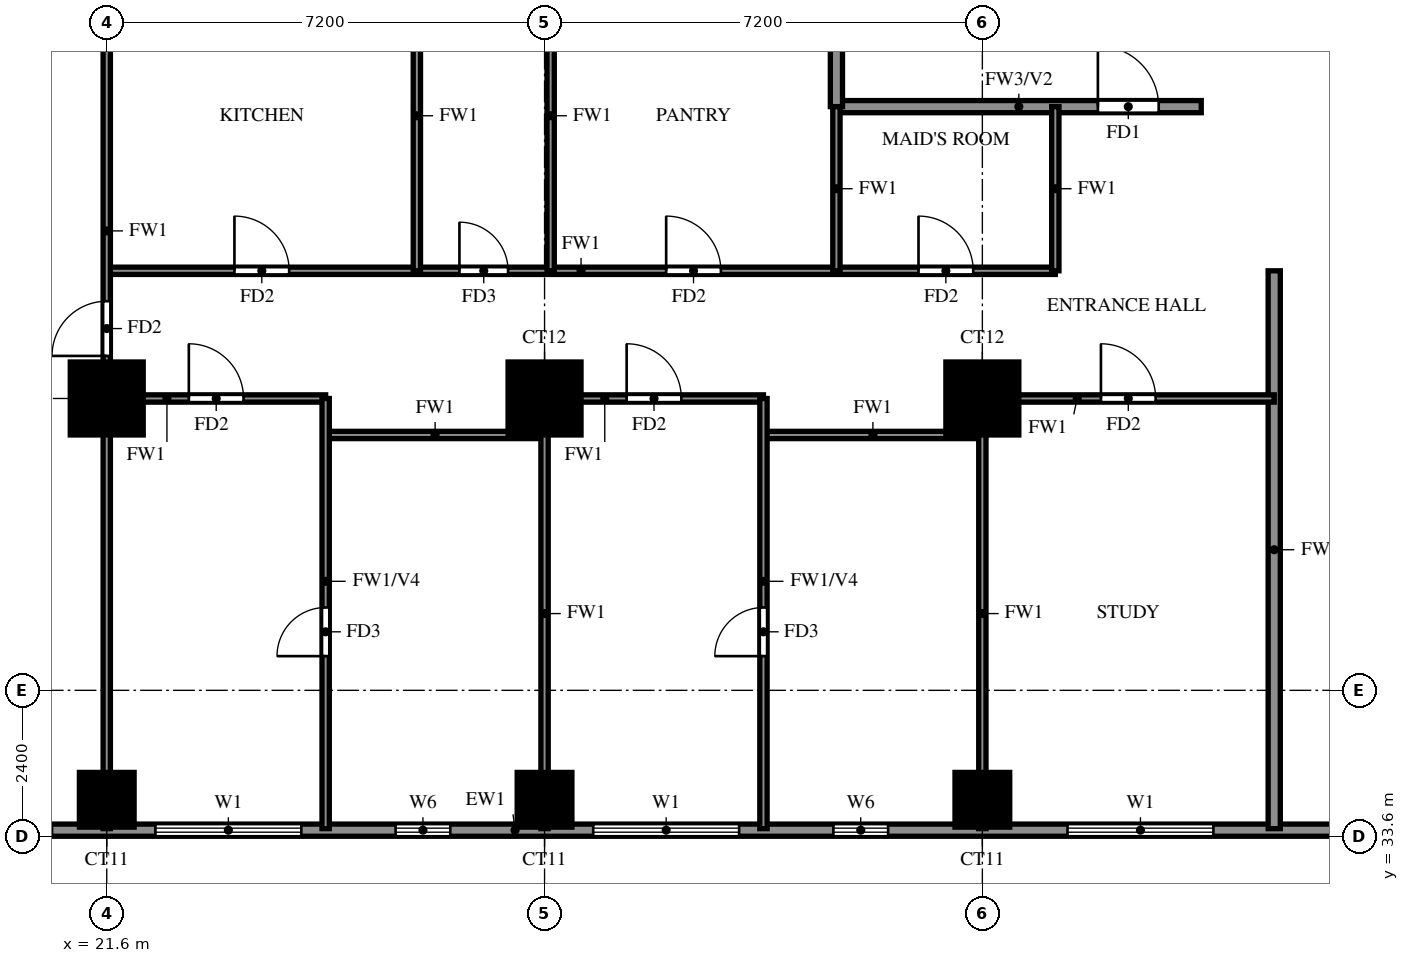
"""IFC4 building model, lengths in metres.
Left out: names, types, materials, properties, quantities, classifications, styles, units other than length and angle.
Written with IfcOpenShell. Run it as: python <this file> out.ifc"""

import sys

from ifc_helpers import new_model, si_unit, direction, frame, frame_2d, origin, origin_2d, place, context, subcontext, project, spatial, rectangle, extrude, source, transform, mapped, element, fill, save


model = new_model("IFC4")
c1 = context("Model", 3, precision=1e-05, world=origin(), true_north=direction((0.0, 1.0)))
c2 = subcontext(c1, "Body", "Model", "MODEL_VIEW")
j1 = project(units=[si_unit("LENGTHUNIT", "METRE"), si_unit("PLANEANGLEUNIT", "RADIAN")], contexts=[c1])
p1 = place(None, origin())
s1 = spatial("IfcSite", under=j1, at=p1, CompositionType="ELEMENT")
p2 = place(p1, origin())
s2 = spatial("IfcBuilding", under=s1, at=p2, CompositionType="ELEMENT")
p3 = place(p2, frame((0.0, 0.0, 100.5)))
s3 = spatial("IfcBuildingStorey", under=s2, at=p3, CompositionType="ELEMENT", Elevation=100.5)
m1 = source(origin(), c2, "Body", "SweptSolid", [
    extrude(rectangle(XDim=0.9, YDim=0.9, at=origin_2d()), origin(), (0.0, 0.0, 1.0), 3.18),
])
for number, where, z_axis, x_axis in (
    (1, (21.6, 34.2, 0.0), (0.0, 0.0, 1.0), (1.0, 0.0, 0.0)),
    (2, (28.8, 34.2, 0.0), (0.0, 0.0, 1.0), (1.0, 0.0, 0.0)),
    (3, (36.0, 34.2, 0.0), (0.0, 0.0, 1.0), (1.0, 0.0, 0.0)),
):
    element("IfcColumn", number, at=place(p3, frame(where, z_axis=z_axis, x_axis=x_axis)), inside=s3, PredefinedType="COLUMN", context=c2, shape_type="MappedRepresentation", body=[
        mapped(m1, transform((0.0, 0.0, 0.0))),
    ])
m2 = source(origin(), c2, "Body", "SweptSolid", [
    extrude(rectangle(XDim=1.2, YDim=1.2, at=origin_2d()), origin(), (0.0, 0.0, 1.0), 3.18),
])
for number, where, z_axis, x_axis in (
    (4, (21.6, 40.8, 0.0), (0.0, 0.0, 1.0), (1.0, 0.0, 0.0)),
    (5, (28.8, 40.8, 0.0), (0.0, 0.0, 1.0), (1.0, 0.0, 0.0)),
    (6, (36.0, 40.8, 0.0), (0.0, 0.0, 1.0), (1.0, 0.0, 0.0)),
):
    element("IfcColumn", number, at=place(p3, frame(where, z_axis=z_axis, x_axis=x_axis)), inside=s3, PredefinedType="COLUMN", context=c2, shape_type="MappedRepresentation", body=[
        mapped(m2, transform((0.0, 0.0, 0.0))),
    ])
p4 = place(p3, frame((18.2, 33.7, 0.0), z_axis=(0.0, 0.0, 1.0), x_axis=(1.0, 0.0, 0.0)))
e7 = element("IfcWall", 7, at=p4, inside=s3, PredefinedType="SOLIDWALL", context=c2, shape_type="SweptSolid", body=[
    extrude(rectangle(XDim=23.8, YDim=0.2, at=frame_2d((11.9, 0.0))), origin(), (0.0, 0.0, 1.0), 3.18),
])
p5 = place(p4, frame((0.7, 0.0, 0.6)))
e8 = element("IfcOpeningElement", 8, at=p5, cuts=e7, PredefinedType="OPENING", context=c2, shape_type="SweptSolid", body=[
    extrude(rectangle(XDim=1.8, YDim=2.4, at=frame_2d((0.9, 1.2))), frame((0.0, 0.11, 0.0), z_axis=(0.0, -1.0, 0.0), x_axis=(1.0, 0.0, 0.0)), (0.0, 0.0, 1.0), 0.22),
])
p6 = place(p4, frame((4.2, 0.0, 0.6)))
e9 = element("IfcOpeningElement", 9, at=p6, cuts=e7, PredefinedType="OPENING", context=c2, shape_type="SweptSolid", body=[
    extrude(rectangle(XDim=2.4, YDim=2.4, at=frame_2d((1.2, 1.2))), frame((0.0, 0.11, 0.0), z_axis=(0.0, -1.0, 0.0), x_axis=(1.0, 0.0, 0.0)), (0.0, 0.0, 1.0), 0.22),
])
p7 = place(p4, frame((8.15, 0.0, 1.5)))
e10 = element("IfcOpeningElement", 10, at=p7, cuts=e7, PredefinedType="OPENING", context=c2, shape_type="SweptSolid", body=[
    extrude(rectangle(XDim=0.9, YDim=0.9, at=frame_2d((0.45, 0.45))), frame((0.0, 0.11, 0.0), z_axis=(0.0, -1.0, 0.0), x_axis=(1.0, 0.0, 0.0)), (0.0, 0.0, 1.0), 0.22),
])
p8 = place(p4, frame((11.4, 0.0, 0.6)))
e11 = element("IfcOpeningElement", 11, at=p8, cuts=e7, PredefinedType="OPENING", context=c2, shape_type="SweptSolid", body=[
    extrude(rectangle(XDim=2.4, YDim=2.4, at=frame_2d((1.2, 1.2))), frame((0.0, 0.11, 0.0), z_axis=(0.0, -1.0, 0.0), x_axis=(1.0, 0.0, 0.0)), (0.0, 0.0, 1.0), 0.22),
])
p9 = place(p4, frame((15.35, 0.0, 1.5)))
e12 = element("IfcOpeningElement", 12, at=p9, cuts=e7, PredefinedType="OPENING", context=c2, shape_type="SweptSolid", body=[
    extrude(rectangle(XDim=0.9, YDim=0.9, at=frame_2d((0.45, 0.45))), frame((0.0, 0.11, 0.0), z_axis=(0.0, -1.0, 0.0), x_axis=(1.0, 0.0, 0.0)), (0.0, 0.0, 1.0), 0.22),
])
p10 = place(p4, frame((19.2, 0.0, 0.6)))
e13 = element("IfcOpeningElement", 13, at=p10, cuts=e7, PredefinedType="OPENING", context=c2, shape_type="SweptSolid", body=[
    extrude(rectangle(XDim=2.4, YDim=2.4, at=frame_2d((1.2, 1.2))), frame((0.0, 0.11, 0.0), z_axis=(0.0, -1.0, 0.0), x_axis=(1.0, 0.0, 0.0)), (0.0, 0.0, 1.0), 0.22),
])
p11 = place(p3, frame((33.6, 45.6, 0.0), z_axis=(0.0, 0.0, 1.0), x_axis=(1.0, 0.0, 0.0)))
e14 = element("IfcWall", 14, at=p11, inside=s3, PredefinedType="SOLIDWALL", context=c2, shape_type="SweptSolid", body=[
    extrude(rectangle(XDim=6.0, YDim=0.2, at=frame_2d((3.0, 0.0))), origin(), (0.0, 0.0, 1.0), 3.18),
])
p12 = place(p11, frame((4.3, 0.0, 0.0)))
e15 = element("IfcOpeningElement", 15, at=p12, cuts=e14, PredefinedType="OPENING", context=c2, shape_type="SweptSolid", body=[
    extrude(rectangle(XDim=1.0, YDim=2.1, at=frame_2d((0.5, 1.05))), frame((0.0, 0.11, 0.0), z_axis=(0.0, -1.0, 0.0), x_axis=(1.0, 0.0, 0.0)), (0.0, 0.0, 1.0), 0.22),
])
p13 = place(p3, frame((33.6, 45.6, 0.0), z_axis=(0.0, 0.0, 1.0), x_axis=(0.0, 1.0, 0.0)))
e16 = element("IfcWall", 16, at=p13, inside=s3, PredefinedType="SOLIDWALL", context=c2, shape_type="SweptSolid", body=[
    extrude(rectangle(XDim=10.8, YDim=0.2, at=frame_2d((5.4, 0.0))), origin(), (0.0, 0.0, 1.0), 3.18),
])
p14 = place(p3, frame((40.8, 33.725, 0.0), z_axis=(0.0, 0.0, 1.0), x_axis=(0.0, 1.0, 0.0)))
e17 = element("IfcWall", 17, at=p14, inside=s3, PredefinedType="SOLIDWALL", context=c2, shape_type="SweptSolid", body=[
    extrude(rectangle(XDim=9.175, YDim=0.2, at=frame_2d((4.587, 0.0))), origin(), (0.0, 0.0, 1.0), 2.28),
])
for number, where, z_axis, x_axis in (
    (18, (25.2, 40.2, 0.0), (0.0, 0.0, 1.0), (1.0, 0.0, 0.0)),
    (19, (32.4, 40.2, 0.0), (0.0, 0.0, 1.0), (1.0, 0.0, 0.0)),
):
    element("IfcWall", number, at=place(p3, frame(where, z_axis=z_axis, x_axis=x_axis)), inside=s3, PredefinedType="PARTITIONING", context=c2, shape_type="SweptSolid", body=[
        extrude(rectangle(XDim=3.6, YDim=0.12, at=frame_2d((1.8, 0.0))), origin(), (0.0, 0.0, 1.0), 3.18),
    ])
p15 = place(p3, frame((21.6, 40.8, 0.0), z_axis=(0.0, 0.0, 1.0), x_axis=(1.0, 0.0, 0.0)))
e20 = element("IfcWall", 20, at=p15, inside=s3, PredefinedType="PARTITIONING", context=c2, shape_type="SweptSolid", body=[
    extrude(rectangle(XDim=3.6, YDim=0.12, at=frame_2d((1.8, 0.0))), origin(), (0.0, 0.0, 1.0), 3.18),
])
p16 = place(p15, frame((1.35, 0.0, 0.0)))
e21 = element("IfcOpeningElement", 21, at=p16, cuts=e20, PredefinedType="OPENING", context=c2, shape_type="SweptSolid", body=[
    extrude(rectangle(XDim=0.9, YDim=2.1, at=frame_2d((0.45, 1.05))), frame((0.0, 0.07, 0.0), z_axis=(0.0, -1.0, 0.0), x_axis=(1.0, 0.0, 0.0)), (0.0, 0.0, 1.0), 0.14),
])
p17 = place(p3, frame((28.8, 40.8, 0.0), z_axis=(0.0, 0.0, 1.0), x_axis=(1.0, 0.0, 0.0)))
e22 = element("IfcWall", 22, at=p17, inside=s3, PredefinedType="PARTITIONING", context=c2, shape_type="SweptSolid", body=[
    extrude(rectangle(XDim=3.6, YDim=0.12, at=frame_2d((1.8, 0.0))), origin(), (0.0, 0.0, 1.0), 3.18),
])
p18 = place(p17, frame((1.35, 0.0, 0.0)))
e23 = element("IfcOpeningElement", 23, at=p18, cuts=e22, PredefinedType="OPENING", context=c2, shape_type="SweptSolid", body=[
    extrude(rectangle(XDim=0.9, YDim=2.1, at=frame_2d((0.45, 1.05))), frame((0.0, 0.07, 0.0), z_axis=(0.0, -1.0, 0.0), x_axis=(1.0, 0.0, 0.0)), (0.0, 0.0, 1.0), 0.14),
])
p19 = place(p3, frame((36.0, 40.8, 0.0), z_axis=(0.0, 0.0, 1.0), x_axis=(1.0, 0.0, 0.0)))
e24 = element("IfcWall", 24, at=p19, inside=s3, PredefinedType="PARTITIONING", context=c2, shape_type="SweptSolid", body=[
    extrude(rectangle(XDim=4.8, YDim=0.12, at=frame_2d((2.4, 0.0))), origin(), (0.0, 0.0, 1.0), 3.18),
])
p20 = place(p19, frame((1.95, 0.0, 0.0)))
e25 = element("IfcOpeningElement", 25, at=p20, cuts=e24, PredefinedType="OPENING", context=c2, shape_type="SweptSolid", body=[
    extrude(rectangle(XDim=0.9, YDim=2.1, at=frame_2d((0.45, 1.05))), frame((0.0, 0.07, 0.0), z_axis=(0.0, -1.0, 0.0), x_axis=(1.0, 0.0, 0.0)), (0.0, 0.0, 1.0), 0.14),
])
p21 = place(p3, frame((21.6, 42.9, 0.0), z_axis=(0.0, 0.0, 1.0), x_axis=(1.0, 0.0, 0.0)))
e26 = element("IfcWall", 26, at=p21, inside=s3, PredefinedType="PARTITIONING", context=c2, shape_type="SweptSolid", body=[
    extrude(rectangle(XDim=15.6, YDim=0.12, at=frame_2d((7.8, 0.0))), origin(), (0.0, 0.0, 1.0), 3.18),
])
p22 = place(p21, frame((2.1, 0.0, 0.0)))
e27 = element("IfcOpeningElement", 27, at=p22, cuts=e26, PredefinedType="OPENING", context=c2, shape_type="SweptSolid", body=[
    extrude(rectangle(XDim=0.9, YDim=2.1, at=frame_2d((0.45, 1.05))), frame((0.0, 0.07, 0.0), z_axis=(0.0, -1.0, 0.0), x_axis=(1.0, 0.0, 0.0)), (0.0, 0.0, 1.0), 0.14),
])
p23 = place(p21, frame((5.8, 0.0, 0.0)))
e28 = element("IfcOpeningElement", 28, at=p23, cuts=e26, PredefinedType="OPENING", context=c2, shape_type="SweptSolid", body=[
    extrude(rectangle(XDim=0.8, YDim=2.1, at=frame_2d((0.4, 1.05))), frame((0.0, 0.07, 0.0), z_axis=(0.0, -1.0, 0.0), x_axis=(1.0, 0.0, 0.0)), (0.0, 0.0, 1.0), 0.14),
])
p24 = place(p21, frame((9.2, 0.0, 0.0)))
e29 = element("IfcOpeningElement", 29, at=p24, cuts=e26, PredefinedType="OPENING", context=c2, shape_type="SweptSolid", body=[
    extrude(rectangle(XDim=0.9, YDim=2.1, at=frame_2d((0.45, 1.05))), frame((0.0, 0.07, 0.0), z_axis=(0.0, -1.0, 0.0), x_axis=(1.0, 0.0, 0.0)), (0.0, 0.0, 1.0), 0.14),
])
p25 = place(p21, frame((13.35, 0.0, 0.0)))
e30 = element("IfcOpeningElement", 30, at=p25, cuts=e26, PredefinedType="OPENING", context=c2, shape_type="SweptSolid", body=[
    extrude(rectangle(XDim=0.9, YDim=2.1, at=frame_2d((0.45, 1.05))), frame((0.0, 0.07, 0.0), z_axis=(0.0, -1.0, 0.0), x_axis=(1.0, 0.0, 0.0)), (0.0, 0.0, 1.0), 0.14),
])
p26 = place(p3, frame((21.6, 33.725, 0.0), z_axis=(0.0, 0.0, 1.0), x_axis=(0.0, 1.0, 0.0)))
e31 = element("IfcWall", 31, at=p26, inside=s3, PredefinedType="PARTITIONING", context=c2, shape_type="SweptSolid", body=[
    extrude(rectangle(XDim=17.875, YDim=0.12, at=frame_2d((8.938, 0.0))), origin(), (0.0, 0.0, 1.0), 3.18),
])
p27 = place(p26, frame((7.775, 0.0, 0.0)))
e32 = element("IfcOpeningElement", 32, at=p27, cuts=e31, PredefinedType="OPENING", context=c2, shape_type="SweptSolid", body=[
    extrude(rectangle(XDim=0.9, YDim=2.1, at=frame_2d((0.45, 1.05))), frame((0.0, 0.07, 0.0), z_axis=(0.0, -1.0, 0.0), x_axis=(1.0, 0.0, 0.0)), (0.0, 0.0, 1.0), 0.14),
])
p28 = place(p26, frame((15.625, 0.0, 0.0)))
e33 = element("IfcOpeningElement", 33, at=p28, cuts=e31, PredefinedType="OPENING", context=c2, shape_type="SweptSolid", body=[
    extrude(rectangle(XDim=0.9, YDim=2.1, at=frame_2d((0.45, 1.05))), frame((0.0, 0.07, 0.0), z_axis=(0.0, -1.0, 0.0), x_axis=(1.0, 0.0, 0.0)), (0.0, 0.0, 1.0), 0.14),
])
p29 = place(p3, frame((25.2, 33.725, 0.0), z_axis=(0.0, 0.0, 1.0), x_axis=(0.0, 1.0, 0.0)))
e34 = element("IfcWall", 34, at=p29, inside=s3, PredefinedType="PARTITIONING", context=c2, shape_type="SweptSolid", body=[
    extrude(rectangle(XDim=7.075, YDim=0.12, at=frame_2d((3.538, 0.0))), origin(), (0.0, 0.0, 1.0), 2.28),
])
p30 = place(p29, frame((2.837, 0.0, 0.0)))
e35 = element("IfcOpeningElement", 35, at=p30, cuts=e34, PredefinedType="OPENING", context=c2, shape_type="SweptSolid", body=[
    extrude(rectangle(XDim=0.8, YDim=2.1, at=frame_2d((0.4, 1.05))), frame((0.0, 0.07, 0.0), z_axis=(0.0, -1.0, 0.0), x_axis=(1.0, 0.0, 0.0)), (0.0, 0.0, 1.0), 0.14),
])
p31 = place(p3, frame((26.7, 42.9, 0.0), z_axis=(0.0, 0.0, 1.0), x_axis=(0.0, 1.0, 0.0)))
e36 = element("IfcWall", 36, at=p31, inside=s3, PredefinedType="PARTITIONING", context=c2, shape_type="SweptSolid", body=[
    extrude(rectangle(XDim=5.1, YDim=0.12, at=frame_2d((2.55, 0.0))), origin(), (0.0, 0.0, 1.0), 3.18),
])
p32 = place(p3, frame((28.8, 33.725, 0.0), z_axis=(0.0, 0.0, 1.0), x_axis=(0.0, 1.0, 0.0)))
e37 = element("IfcWall", 37, at=p32, inside=s3, PredefinedType="PARTITIONING", context=c2, shape_type="SweptSolid", body=[
    extrude(rectangle(XDim=7.075, YDim=0.12, at=frame_2d((3.538, 0.0))), origin(), (0.0, 0.0, 1.0), 3.18),
])
p33 = place(p3, frame((28.9, 42.9, 0.0), z_axis=(0.0, 0.0, 1.0), x_axis=(0.0, 1.0, 0.0)))
e38 = element("IfcWall", 38, at=p33, inside=s3, PredefinedType="PARTITIONING", context=c2, shape_type="SweptSolid", body=[
    extrude(rectangle(XDim=5.1, YDim=0.12, at=frame_2d((2.55, 0.0))), origin(), (0.0, 0.0, 1.0), 3.18),
])
p34 = place(p3, frame((32.4, 33.725, 0.0), z_axis=(0.0, 0.0, 1.0), x_axis=(0.0, 1.0, 0.0)))
e39 = element("IfcWall", 39, at=p34, inside=s3, PredefinedType="PARTITIONING", context=c2, shape_type="SweptSolid", body=[
    extrude(rectangle(XDim=7.075, YDim=0.12, at=frame_2d((3.538, 0.0))), origin(), (0.0, 0.0, 1.0), 2.28),
])
p35 = place(p34, frame((2.837, 0.0, 0.0)))
e40 = element("IfcOpeningElement", 40, at=p35, cuts=e39, PredefinedType="OPENING", context=c2, shape_type="SweptSolid", body=[
    extrude(rectangle(XDim=0.8, YDim=2.1, at=frame_2d((0.4, 1.05))), frame((0.0, 0.07, 0.0), z_axis=(0.0, -1.0, 0.0), x_axis=(1.0, 0.0, 0.0)), (0.0, 0.0, 1.0), 0.14),
])
p36 = place(p3, frame((33.6, 42.9, 0.0), z_axis=(0.0, 0.0, 1.0), x_axis=(0.0, 1.0, 0.0)))
e41 = element("IfcWall", 41, at=p36, inside=s3, PredefinedType="PARTITIONING", context=c2, shape_type="SweptSolid", body=[
    extrude(rectangle(XDim=2.7, YDim=0.12, at=frame_2d((1.35, 0.0))), origin(), (0.0, 0.0, 1.0), 3.18),
])
p37 = place(p3, frame((36.0, 33.725, 0.0), z_axis=(0.0, 0.0, 1.0), x_axis=(0.0, 1.0, 0.0)))
e42 = element("IfcWall", 42, at=p37, inside=s3, PredefinedType="PARTITIONING", context=c2, shape_type="SweptSolid", body=[
    extrude(rectangle(XDim=7.075, YDim=0.12, at=frame_2d((3.538, 0.0))), origin(), (0.0, 0.0, 1.0), 3.18),
])
p38 = place(p3, frame((37.2, 42.9, 0.0), z_axis=(0.0, 0.0, 1.0), x_axis=(0.0, 1.0, 0.0)))
e43 = element("IfcWall", 43, at=p38, inside=s3, PredefinedType="PARTITIONING", context=c2, shape_type="SweptSolid", body=[
    extrude(rectangle(XDim=2.7, YDim=0.12, at=frame_2d((1.35, 0.0))), origin(), (0.0, 0.0, 1.0), 3.18),
])
p39 = place(p6, origin())
e44 = element("IfcWindow", 44, at=p39, inside=s3, PartitioningType="DOUBLE_PANEL_VERTICAL", PredefinedType="WINDOW", context=c2, shape_type="SweptSolid", body=[
    extrude(rectangle(XDim=2.4, YDim=2.4, at=frame_2d((1.2, 1.2))), frame((0.0, 0.03, 0.0), z_axis=(0.0, -1.0, 0.0), x_axis=(1.0, 0.0, 0.0)), (0.0, 0.0, 1.0), 0.06),
])
fill(e9, e44)
p40 = place(p7, origin())
e45 = element("IfcWindow", 45, at=p40, inside=s3, PartitioningType="SINGLE_PANEL", PredefinedType="WINDOW", context=c2, shape_type="SweptSolid", body=[
    extrude(rectangle(XDim=0.9, YDim=0.9, at=frame_2d((0.45, 0.45))), frame((0.0, 0.03, 0.0), z_axis=(0.0, -1.0, 0.0), x_axis=(1.0, 0.0, 0.0)), (0.0, 0.0, 1.0), 0.06),
])
fill(e10, e45)
p41 = place(p8, origin())
e46 = element("IfcWindow", 46, at=p41, inside=s3, PartitioningType="DOUBLE_PANEL_VERTICAL", PredefinedType="WINDOW", context=c2, shape_type="SweptSolid", body=[
    extrude(rectangle(XDim=2.4, YDim=2.4, at=frame_2d((1.2, 1.2))), frame((0.0, 0.03, 0.0), z_axis=(0.0, -1.0, 0.0), x_axis=(1.0, 0.0, 0.0)), (0.0, 0.0, 1.0), 0.06),
])
fill(e11, e46)
p42 = place(p9, origin())
e47 = element("IfcWindow", 47, at=p42, inside=s3, PartitioningType="SINGLE_PANEL", PredefinedType="WINDOW", context=c2, shape_type="SweptSolid", body=[
    extrude(rectangle(XDim=0.9, YDim=0.9, at=frame_2d((0.45, 0.45))), frame((0.0, 0.03, 0.0), z_axis=(0.0, -1.0, 0.0), x_axis=(1.0, 0.0, 0.0)), (0.0, 0.0, 1.0), 0.06),
])
fill(e12, e47)
p43 = place(p10, origin())
e48 = element("IfcWindow", 48, at=p43, inside=s3, PartitioningType="DOUBLE_PANEL_VERTICAL", PredefinedType="WINDOW", context=c2, shape_type="SweptSolid", body=[
    extrude(rectangle(XDim=2.4, YDim=2.4, at=frame_2d((1.2, 1.2))), frame((0.0, 0.03, 0.0), z_axis=(0.0, -1.0, 0.0), x_axis=(1.0, 0.0, 0.0)), (0.0, 0.0, 1.0), 0.06),
])
fill(e13, e48)
p44 = place(p12, origin())
e49 = element("IfcDoor", 49, at=p44, inside=s3, OperationType="SINGLE_SWING_LEFT", PredefinedType="DOOR", context=c2, shape_type="SweptSolid", body=[
    extrude(rectangle(XDim=1.0, YDim=2.1, at=frame_2d((0.5, 1.05))), frame((0.0, 0.025, 0.0), z_axis=(0.0, -1.0, 0.0), x_axis=(1.0, 0.0, 0.0)), (0.0, 0.0, 1.0), 0.05),
])
fill(e15, e49)
p45 = place(p27, origin())
e50 = element("IfcDoor", 50, at=p45, inside=s3, OperationType="SINGLE_SWING_LEFT", PredefinedType="DOOR", context=c2, shape_type="SweptSolid", body=[
    extrude(rectangle(XDim=0.9, YDim=2.1, at=frame_2d((0.45, 1.05))), frame((0.0, 0.025, 0.0), z_axis=(0.0, -1.0, 0.0), x_axis=(1.0, 0.0, 0.0)), (0.0, 0.0, 1.0), 0.05),
])
fill(e32, e50)
p46 = place(p16, origin())
e51 = element("IfcDoor", 51, at=p46, inside=s3, OperationType="SINGLE_SWING_LEFT", PredefinedType="DOOR", context=c2, shape_type="SweptSolid", body=[
    extrude(rectangle(XDim=0.9, YDim=2.1, at=frame_2d((0.45, 1.05))), frame((0.0, 0.025, 0.0), z_axis=(0.0, -1.0, 0.0), x_axis=(1.0, 0.0, 0.0)), (0.0, 0.0, 1.0), 0.05),
])
fill(e21, e51)
p47 = place(p30, origin())
e52 = element("IfcDoor", 52, at=p47, inside=s3, OperationType="SINGLE_SWING_LEFT", PredefinedType="DOOR", context=c2, shape_type="SweptSolid", body=[
    extrude(rectangle(XDim=0.8, YDim=2.1, at=frame_2d((0.4, 1.05))), frame((0.0, 0.025, 0.0), z_axis=(0.0, -1.0, 0.0), x_axis=(1.0, 0.0, 0.0)), (0.0, 0.0, 1.0), 0.05),
])
fill(e35, e52)
p48 = place(p18, origin())
e53 = element("IfcDoor", 53, at=p48, inside=s3, OperationType="SINGLE_SWING_RIGHT", PredefinedType="DOOR", context=c2, shape_type="SweptSolid", body=[
    extrude(rectangle(XDim=0.9, YDim=2.1, at=frame_2d((0.45, 1.05))), frame((0.0, 0.025, 0.0), z_axis=(0.0, -1.0, 0.0), x_axis=(1.0, 0.0, 0.0)), (0.0, 0.0, 1.0), 0.05),
])
fill(e23, e53)
p49 = place(p35, origin())
e54 = element("IfcDoor", 54, at=p49, inside=s3, OperationType="SINGLE_SWING_LEFT", PredefinedType="DOOR", context=c2, shape_type="SweptSolid", body=[
    extrude(rectangle(XDim=0.8, YDim=2.1, at=frame_2d((0.4, 1.05))), frame((0.0, 0.025, 0.0), z_axis=(0.0, -1.0, 0.0), x_axis=(1.0, 0.0, 0.0)), (0.0, 0.0, 1.0), 0.05),
])
fill(e40, e54)
p50 = place(p20, origin())
e55 = element("IfcDoor", 55, at=p50, inside=s3, OperationType="SINGLE_SWING_LEFT", PredefinedType="DOOR", context=c2, shape_type="SweptSolid", body=[
    extrude(rectangle(XDim=0.9, YDim=2.1, at=frame_2d((0.45, 1.05))), frame((0.0, 0.025, 0.0), z_axis=(0.0, -1.0, 0.0), x_axis=(1.0, 0.0, 0.0)), (0.0, 0.0, 1.0), 0.05),
])
fill(e25, e55)
p51 = place(p22, origin())
e56 = element("IfcDoor", 56, at=p51, inside=s3, OperationType="SINGLE_SWING_RIGHT", PredefinedType="DOOR", context=c2, shape_type="SweptSolid", body=[
    extrude(rectangle(XDim=0.9, YDim=2.1, at=frame_2d((0.45, 1.05))), frame((0.0, 0.025, 0.0), z_axis=(0.0, -1.0, 0.0), x_axis=(1.0, 0.0, 0.0)), (0.0, 0.0, 1.0), 0.05),
])
fill(e27, e56)
p52 = place(p23, origin())
e57 = element("IfcDoor", 57, at=p52, inside=s3, OperationType="SINGLE_SWING_LEFT", PredefinedType="DOOR", context=c2, shape_type="SweptSolid", body=[
    extrude(rectangle(XDim=0.8, YDim=2.1, at=frame_2d((0.4, 1.05))), frame((0.0, 0.025, 0.0), z_axis=(0.0, -1.0, 0.0), x_axis=(1.0, 0.0, 0.0)), (0.0, 0.0, 1.0), 0.05),
])
fill(e28, e57)
p53 = place(p24, origin())
e58 = element("IfcDoor", 58, at=p53, inside=s3, OperationType="SINGLE_SWING_LEFT", PredefinedType="DOOR", context=c2, shape_type="SweptSolid", body=[
    extrude(rectangle(XDim=0.9, YDim=2.1, at=frame_2d((0.45, 1.05))), frame((0.0, 0.025, 0.0), z_axis=(0.0, -1.0, 0.0), x_axis=(1.0, 0.0, 0.0)), (0.0, 0.0, 1.0), 0.05),
])
fill(e29, e58)
p54 = place(p25, origin())
e59 = element("IfcDoor", 59, at=p54, inside=s3, OperationType="SINGLE_SWING_RIGHT", PredefinedType="DOOR", context=c2, shape_type="SweptSolid", body=[
    extrude(rectangle(XDim=0.9, YDim=2.1, at=frame_2d((0.45, 1.05))), frame((0.0, 0.025, 0.0), z_axis=(0.0, -1.0, 0.0), x_axis=(1.0, 0.0, 0.0)), (0.0, 0.0, 1.0), 0.05),
])
fill(e30, e59)
save(model, sys.argv[1])
